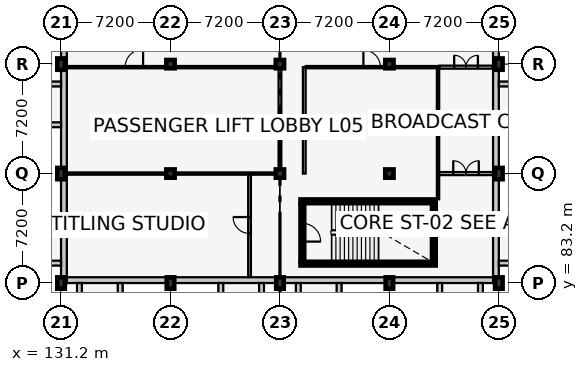
"""IFC4 building model, lengths in metres.
Left out: names, types, materials, properties, quantities, classifications, styles, units other than length and angle.
Written with IfcOpenShell. Run it as: python <this file> out.ifc"""

import sys

from ifc_helpers import new_model, si_unit, direction, frame, frame_2d, origin, origin_2d, place, context, subcontext, project, spatial, rectangle, extrude, element, fill, save


model = new_model("IFC4")
c1 = context("Model", 3, precision=1e-05, world=origin(), true_north=direction((0.0, 1.0)))
c2 = subcontext(c1, "Body", "Model", "MODEL_VIEW")
j1 = project(units=[si_unit("LENGTHUNIT", "METRE"), si_unit("PLANEANGLEUNIT", "RADIAN")], contexts=[c1])
p1 = place(None, origin())
s1 = spatial("IfcSite", under=j1, at=p1, CompositionType="ELEMENT")
p2 = place(p1, origin())
s2 = spatial("IfcBuilding", under=s1, at=p2, CompositionType="ELEMENT")
p3 = place(p2, frame((0.0, 0.0, 21.9)))
s3 = spatial("IfcBuildingStorey", under=s2, at=p3, CompositionType="ELEMENT", Elevation=21.9)
for number, where, z_axis, x_axis in (
    (1, (131.2, 83.2, 0.0), (0.0, 0.0, 1.0), (1.0, 0.0, 0.0)),
    (2, (131.2, 90.4, 0.0), (0.0, 0.0, 1.0), (1.0, 0.0, 0.0)),
    (3, (131.2, 97.6, 0.0), (0.0, 0.0, 1.0), (1.0, 0.0, 0.0)),
    (4, (138.4, 83.2, 0.0), (0.0, 0.0, 1.0), (1.0, 0.0, 0.0)),
):
    element("IfcColumn", number, at=place(p3, frame(where, z_axis=z_axis, x_axis=x_axis)), inside=s3, PredefinedType="COLUMN", context=c2, shape_type="SweptSolid", body=[
        extrude(rectangle(XDim=0.5, YDim=0.75, at=origin_2d()), origin(), (0.0, 0.0, 1.0), 3.9),
    ])
for number, where, z_axis, x_axis in (
    (5, (138.4, 90.4, 0.0), (0.0, 0.0, 1.0), (1.0, 0.0, 0.0)),
    (6, (138.4, 97.6, 0.0), (0.0, 0.0, 1.0), (1.0, 0.0, 0.0)),
):
    element("IfcColumn", number, at=place(p3, frame(where, z_axis=z_axis, x_axis=x_axis)), inside=s3, PredefinedType="COLUMN", context=c2, shape_type="SweptSolid", body=[
        extrude(rectangle(XDim=0.55, YDim=0.55, at=origin_2d()), origin(), (0.0, 0.0, 1.0), 3.9),
    ])
p4 = place(p3, frame((145.6, 83.2, 0.0), z_axis=(0.0, 0.0, 1.0), x_axis=(1.0, 0.0, 0.0)))
e7 = element("IfcColumn", 7, at=p4, inside=s3, PredefinedType="COLUMN", context=c2, shape_type="SweptSolid", body=[
    extrude(rectangle(XDim=0.5, YDim=0.75, at=origin_2d()), origin(), (0.0, 0.0, 1.0), 3.9),
])
for number, where, z_axis, x_axis in (
    (8, (145.6, 90.4, 0.0), (0.0, 0.0, 1.0), (1.0, 0.0, 0.0)),
    (9, (145.6, 97.6, 0.0), (0.0, 0.0, 1.0), (1.0, 0.0, 0.0)),
):
    element("IfcColumn", number, at=place(p3, frame(where, z_axis=z_axis, x_axis=x_axis)), inside=s3, PredefinedType="COLUMN", context=c2, shape_type="SweptSolid", body=[
        extrude(rectangle(XDim=0.55, YDim=0.55, at=origin_2d()), origin(), (0.0, 0.0, 1.0), 3.9),
    ])
p5 = place(p3, frame((152.8, 83.2, 0.0), z_axis=(0.0, 0.0, 1.0), x_axis=(1.0, 0.0, 0.0)))
e10 = element("IfcColumn", 10, at=p5, inside=s3, PredefinedType="COLUMN", context=c2, shape_type="SweptSolid", body=[
    extrude(rectangle(XDim=0.5, YDim=0.75, at=origin_2d()), origin(), (0.0, 0.0, 1.0), 3.9),
])
for number, where, z_axis, x_axis in (
    (11, (152.8, 90.4, 0.0), (0.0, 0.0, 1.0), (1.0, 0.0, 0.0)),
    (12, (152.8, 97.6, 0.0), (0.0, 0.0, 1.0), (1.0, 0.0, 0.0)),
):
    element("IfcColumn", number, at=place(p3, frame(where, z_axis=z_axis, x_axis=x_axis)), inside=s3, PredefinedType="COLUMN", context=c2, shape_type="SweptSolid", body=[
        extrude(rectangle(XDim=0.55, YDim=0.55, at=origin_2d()), origin(), (0.0, 0.0, 1.0), 3.9),
    ])
for number, where, z_axis, x_axis in (
    (13, (160.0, 83.2, 0.0), (0.0, 0.0, 1.0), (1.0, 0.0, 0.0)),
    (14, (160.0, 90.4, 0.0), (0.0, 0.0, 1.0), (1.0, 0.0, 0.0)),
    (15, (160.0, 97.6, 0.0), (0.0, 0.0, 1.0), (1.0, 0.0, 0.0)),
):
    element("IfcColumn", number, at=place(p3, frame(where, z_axis=z_axis, x_axis=x_axis)), inside=s3, PredefinedType="COLUMN", context=c2, shape_type="SweptSolid", body=[
        extrude(rectangle(XDim=0.5, YDim=0.75, at=origin_2d()), origin(), (0.0, 0.0, 1.0), 3.9),
    ])
p6 = place(p3, frame((160.0, 83.39, 0.0), z_axis=(0.0, 0.0, 1.0), x_axis=(-1.0, 0.0, 0.0)))
e16 = element("IfcWall", 16, at=p6, inside=s3, PredefinedType="SOLIDWALL", context=c2, shape_type="SweptSolid", body=[
    extrude(rectangle(XDim=28.8, YDim=0.38, at=frame_2d((14.4, 0.0))), origin(), (0.0, 0.0, 1.0), 2.955),
])
p7 = place(p3, frame((132.41, 83.2, 0.0), z_axis=(0.0, 0.0, 1.0), x_axis=(0.0, -1.0, 0.0)))
e17 = element("IfcWall", 17, at=p7, inside=s3, PredefinedType="SOLIDWALL", context=c2, shape_type="SweptSolid", body=[
    extrude(rectangle(XDim=1.793, YDim=0.32, at=frame_2d((0.896, 0.0))), origin(), (0.0, 0.0, 1.0), 3.64),
])
for number, where, z_axis, x_axis in (
    (18, (135.09, 83.2, 0.0), (0.0, 0.0, 1.0), (0.0, -1.0, 0.0)),
    (19, (141.71, 83.2, 0.0), (0.0, 0.0, 1.0), (0.0, -1.0, 0.0)),
):
    element("IfcWall", number, at=place(p3, frame(where, z_axis=z_axis, x_axis=x_axis)), inside=s3, PredefinedType="SOLIDWALL", context=c2, shape_type="SweptSolid", body=[
        extrude(rectangle(XDim=1.35, YDim=0.32, at=frame_2d((0.675, 0.0))), origin(), (0.0, 0.0, 1.0), 3.64),
    ])
for number, where, z_axis, x_axis in (
    (20, (144.39, 83.2, 0.0), (0.0, 0.0, 1.0), (0.0, -1.0, 0.0)),
    (21, (146.81, 83.2, 0.0), (0.0, 0.0, 1.0), (0.0, -1.0, 0.0)),
):
    element("IfcWall", number, at=place(p3, frame(where, z_axis=z_axis, x_axis=x_axis)), inside=s3, PredefinedType="SOLIDWALL", context=c2, shape_type="SweptSolid", body=[
        extrude(rectangle(XDim=1.793, YDim=0.32, at=frame_2d((0.896, 0.0))), origin(), (0.0, 0.0, 1.0), 3.64),
    ])
for number, where, z_axis, x_axis in (
    (22, (149.49, 83.2, 0.0), (0.0, 0.0, 1.0), (0.0, -1.0, 0.0)),
    (23, (156.11, 83.2, 0.0), (0.0, 0.0, 1.0), (0.0, -1.0, 0.0)),
):
    element("IfcWall", number, at=place(p3, frame(where, z_axis=z_axis, x_axis=x_axis)), inside=s3, PredefinedType="SOLIDWALL", context=c2, shape_type="SweptSolid", body=[
        extrude(rectangle(XDim=1.35, YDim=0.32, at=frame_2d((0.675, 0.0))), origin(), (0.0, 0.0, 1.0), 3.64),
    ])
p8 = place(p3, frame((158.79, 83.2, 0.0), z_axis=(0.0, 0.0, 1.0), x_axis=(0.0, -1.0, 0.0)))
e24 = element("IfcWall", 24, at=p8, inside=s3, PredefinedType="SOLIDWALL", context=c2, shape_type="SweptSolid", body=[
    extrude(rectangle(XDim=1.793, YDim=0.32, at=frame_2d((0.896, 0.0))), origin(), (0.0, 0.0, 1.0), 3.64),
])
p9 = place(p3, frame((159.81, 112.0, 0.0), z_axis=(0.0, 0.0, 1.0), x_axis=(0.0, -1.0, 0.0)))
e25 = element("IfcWall", 25, at=p9, inside=s3, PredefinedType="SOLIDWALL", context=c2, shape_type="SweptSolid", body=[
    extrude(rectangle(XDim=28.8, YDim=0.38, at=frame_2d((14.4, 0.0))), origin(), (0.0, 0.0, 1.0), 2.915),
])
p10 = place(p3, frame((160.0, 84.51, 0.0), z_axis=(0.0, 0.0, 1.0), x_axis=(1.0, 0.0, 0.0)))
e26 = element("IfcWall", 26, at=p10, inside=s3, PredefinedType="SOLIDWALL", context=c2, shape_type="SweptSolid", body=[
    extrude(rectangle(XDim=1.35, YDim=0.32, at=frame_2d((0.675, 0.0))), origin(), (0.0, 0.0, 1.0), 3.64),
])
for number, where, z_axis, x_axis in (
    (27, (160.0, 87.19, 0.0), (0.0, 0.0, 1.0), (1.0, 0.0, 0.0)),
    (28, (160.0, 93.61, 0.0), (0.0, 0.0, 1.0), (1.0, 0.0, 0.0)),
):
    element("IfcWall", number, at=place(p3, frame(where, z_axis=z_axis, x_axis=x_axis)), inside=s3, PredefinedType="SOLIDWALL", context=c2, shape_type="SweptSolid", body=[
        extrude(rectangle(XDim=1.793, YDim=0.32, at=frame_2d((0.896, 0.0))), origin(), (0.0, 0.0, 1.0), 3.64),
    ])
p11 = place(p3, frame((160.0, 96.29, 0.0), z_axis=(0.0, 0.0, 1.0), x_axis=(1.0, 0.0, 0.0)))
e29 = element("IfcWall", 29, at=p11, inside=s3, PredefinedType="SOLIDWALL", context=c2, shape_type="SweptSolid", body=[
    extrude(rectangle(XDim=1.35, YDim=0.32, at=frame_2d((0.675, 0.0))), origin(), (0.0, 0.0, 1.0), 3.64),
])
p12 = place(p3, frame((131.39, 83.2, 0.0), z_axis=(0.0, 0.0, 1.0), x_axis=(0.0, 1.0, 0.0)))
e30 = element("IfcWall", 30, at=p12, inside=s3, PredefinedType="SOLIDWALL", context=c2, shape_type="SweptSolid", body=[
    extrude(rectangle(XDim=28.8, YDim=0.38, at=frame_2d((14.4, 0.0))), origin(), (0.0, 0.0, 1.0), 2.915),
])
p13 = place(p3, frame((131.2, 84.51, 0.0), z_axis=(0.0, 0.0, 1.0), x_axis=(-1.0, 0.0, 0.0)))
e31 = element("IfcWall", 31, at=p13, inside=s3, PredefinedType="SOLIDWALL", context=c2, shape_type="SweptSolid", body=[
    extrude(rectangle(XDim=1.793, YDim=0.32, at=frame_2d((0.896, 0.0))), origin(), (0.0, 0.0, 1.0), 3.64),
])
for number, where, z_axis, x_axis in (
    (32, (131.2, 87.19, 0.0), (0.0, 0.0, 1.0), (-1.0, 0.0, 0.0)),
    (33, (131.2, 93.61, 0.0), (0.0, 0.0, 1.0), (-1.0, 0.0, 0.0)),
):
    element("IfcWall", number, at=place(p3, frame(where, z_axis=z_axis, x_axis=x_axis)), inside=s3, PredefinedType="SOLIDWALL", context=c2, shape_type="SweptSolid", body=[
        extrude(rectangle(XDim=1.35, YDim=0.32, at=frame_2d((0.675, 0.0))), origin(), (0.0, 0.0, 1.0), 3.64),
    ])
p14 = place(p3, frame((131.2, 96.29, 0.0), z_axis=(0.0, 0.0, 1.0), x_axis=(-1.0, 0.0, 0.0)))
e34 = element("IfcWall", 34, at=p14, inside=s3, PredefinedType="SOLIDWALL", context=c2, shape_type="SweptSolid", body=[
    extrude(rectangle(XDim=1.793, YDim=0.32, at=frame_2d((0.896, 0.0))), origin(), (0.0, 0.0, 1.0), 3.64),
])
for number, where, z_axis, x_axis in (
    (35, (146.95, 84.475, 0.0), (0.0, 0.0, 1.0), (1.0, 0.0, 0.0)),
    (36, (155.85, 88.575, 0.0), (0.0, 0.0, 1.0), (-1.0, 0.0, 0.0)),
):
    element("IfcWall", number, at=place(p3, frame(where, z_axis=z_axis, x_axis=x_axis)), inside=s3, PredefinedType="SHEAR", context=c2, shape_type="SweptSolid", body=[
        extrude(rectangle(XDim=8.9, YDim=0.25, at=frame_2d((4.45, 0.0))), origin(), (0.0, 0.0, 1.0), 3.66),
    ])
p15 = place(p3, frame((147.075, 88.45, 0.0), z_axis=(0.0, 0.0, 1.0), x_axis=(0.0, -1.0, 0.0)))
e37 = element("IfcWall", 37, at=p15, inside=s3, PredefinedType="SHEAR", context=c2, shape_type="SweptSolid", body=[
    extrude(rectangle(XDim=3.85, YDim=0.25, at=frame_2d((1.925, 0.0))), origin(), (0.0, 0.0, 1.0), 3.66),
])
p16 = place(p15, frame((1.325, 0.0, 0.0)))
e38 = element("IfcOpeningElement", 38, at=p16, cuts=e37, PredefinedType="OPENING", context=c2, shape_type="SweptSolid", body=[
    extrude(rectangle(XDim=1.2, YDim=2.15, at=frame_2d((0.6, 1.075))), frame((0.0, 0.137, 0.0), z_axis=(0.0, -1.0, 0.0), x_axis=(1.0, 0.0, 0.0)), (0.0, 0.0, 1.0), 0.274),
])
p17 = place(p3, frame((155.725, 84.6, 0.0), z_axis=(0.0, 0.0, 1.0), x_axis=(0.0, 1.0, 0.0)))
e39 = element("IfcWall", 39, at=p17, inside=s3, PredefinedType="SHEAR", context=c2, shape_type="SweptSolid", body=[
    extrude(rectangle(XDim=3.85, YDim=0.25, at=frame_2d((1.925, 0.0))), origin(), (0.0, 0.0, 1.0), 3.66),
])
p18 = place(p3, frame((143.6, 83.6, 0.0), z_axis=(0.0, 0.0, 1.0), x_axis=(0.0, 1.0, 0.0)))
e40 = element("IfcWall", 40, at=p18, inside=s3, PredefinedType="PARTITIONING", context=c2, shape_type="SweptSolid", body=[
    extrude(rectangle(XDim=6.8, YDim=0.18, at=frame_2d((3.4, 0.0))), origin(), (0.0, 0.0, 1.0), 3.66),
])
p19 = place(p18, frame((2.86, 0.0, 0.0)))
e41 = element("IfcOpeningElement", 41, at=p19, cuts=e40, PredefinedType="OPENING", context=c2, shape_type="SweptSolid", body=[
    extrude(rectangle(XDim=1.08, YDim=2.15, at=frame_2d((0.54, 1.075))), frame((0.0, 0.102, 0.0), z_axis=(0.0, -1.0, 0.0), x_axis=(1.0, 0.0, 0.0)), (0.0, 0.0, 1.0), 0.204),
])
p20 = place(p3, frame((145.6, 90.4, 0.0), z_axis=(0.0, 0.0, 1.0), x_axis=(0.0, 1.0, 0.0)))
e42 = element("IfcWall", 42, at=p20, inside=s3, PredefinedType="PARTITIONING", context=c2, shape_type="SweptSolid", body=[
    extrude(rectangle(XDim=7.0, YDim=0.18, at=frame_2d((3.5, 0.0))), origin(), (0.0, 0.0, 1.0), 3.035),
])
p21 = place(p3, frame((147.2, 90.4, 0.0), z_axis=(0.0, 0.0, 1.0), x_axis=(0.0, 1.0, 0.0)))
e43 = element("IfcWall", 43, at=p21, inside=s3, PredefinedType="PARTITIONING", context=c2, shape_type="SweptSolid", body=[
    extrude(rectangle(XDim=7.0, YDim=0.18, at=frame_2d((3.5, 0.0))), origin(), (0.0, 0.0, 1.0), 3.66),
])
p22 = place(p3, frame((131.6, 90.4, 0.0), z_axis=(0.0, 0.0, 1.0), x_axis=(1.0, 0.0, 0.0)))
e44 = element("IfcWall", 44, at=p22, inside=s3, PredefinedType="PARTITIONING", context=c2, shape_type="SweptSolid", body=[
    extrude(rectangle(XDim=13.9, YDim=0.15, at=frame_2d((6.95, 0.0))), origin(), (0.0, 0.0, 1.0), 2.785),
])
p23 = place(p3, frame((131.6, 97.4, 0.0), z_axis=(0.0, 0.0, 1.0), x_axis=(1.0, 0.0, 0.0)))
e45 = element("IfcWall", 45, at=p23, inside=s3, PredefinedType="PARTITIONING", context=c2, shape_type="SweptSolid", body=[
    extrude(rectangle(XDim=13.9, YDim=0.15, at=frame_2d((6.95, 0.0))), origin(), (0.0, 0.0, 1.0), 2.785),
])
p24 = place(p23, frame((3.816, 0.0, 0.0)))
e46 = element("IfcOpeningElement", 46, at=p24, cuts=e45, PredefinedType="OPENING", context=c2, shape_type="SweptSolid", body=[
    extrude(rectangle(XDim=1.18, YDim=2.2, at=frame_2d((0.59, 1.1))), frame((0.0, 0.087, 0.0), z_axis=(0.0, -1.0, 0.0), x_axis=(1.0, 0.0, 0.0)), (0.0, 0.0, 1.0), 0.174),
])
p25 = place(p3, frame((147.3, 97.4, 0.0), z_axis=(0.0, 0.0, 1.0), x_axis=(1.0, 0.0, 0.0)))
e47 = element("IfcWall", 47, at=p25, inside=s3, PredefinedType="PARTITIONING", context=c2, shape_type="SweptSolid", body=[
    extrude(rectangle(XDim=8.7, YDim=0.15, at=frame_2d((4.35, 0.0))), origin(), (0.0, 0.0, 1.0), 2.935),
])
p26 = place(p25, frame((3.79, 0.0, 0.0)))
e48 = element("IfcOpeningElement", 48, at=p26, cuts=e47, PredefinedType="OPENING", context=c2, shape_type="SweptSolid", body=[
    extrude(rectangle(XDim=1.12, YDim=2.15, at=frame_2d((0.56, 1.075))), frame((0.0, 0.087, 0.0), z_axis=(0.0, -1.0, 0.0), x_axis=(1.0, 0.0, 0.0)), (0.0, 0.0, 1.0), 0.174),
])
p27 = place(p3, frame((156.0, 88.71, 0.0), z_axis=(0.0, 0.0, 1.0), x_axis=(0.0, 1.0, 0.0)))
e49 = element("IfcWall", 49, at=p27, inside=s3, PredefinedType="PARTITIONING", context=c2, shape_type="SweptSolid", body=[
    extrude(rectangle(XDim=8.605, YDim=0.15, at=frame_2d((4.302, 0.0))), origin(), (0.0, 0.0, 1.0), 3.66),
])
p28 = place(p3, frame((156.085, 90.4, 0.0), z_axis=(0.0, 0.0, 1.0), x_axis=(1.0, 0.0, 0.0)))
e50 = element("IfcWall", 50, at=p28, inside=s3, PredefinedType="PARTITIONING", context=c2, shape_type="SweptSolid", body=[
    extrude(rectangle(XDim=3.515, YDim=0.2, at=frame_2d((1.758, 0.0))), origin(), (0.0, 0.0, 1.0), 2.935),
])
p29 = place(p28, frame((0.917, 0.0, 0.0)))
e51 = element("IfcOpeningElement", 51, at=p29, cuts=e50, PredefinedType="OPENING", context=c2, shape_type="SweptSolid", body=[
    extrude(rectangle(XDim=1.68, YDim=2.3, at=frame_2d((0.84, 1.15))), frame((0.0, 0.112, 0.0), z_axis=(0.0, -1.0, 0.0), x_axis=(1.0, 0.0, 0.0)), (0.0, 0.0, 1.0), 0.224),
])
p30 = place(p3, frame((156.085, 97.4, 0.0), z_axis=(0.0, 0.0, 1.0), x_axis=(1.0, 0.0, 0.0)))
e52 = element("IfcWall", 52, at=p30, inside=s3, PredefinedType="PARTITIONING", context=c2, shape_type="SweptSolid", body=[
    extrude(rectangle(XDim=3.515, YDim=0.2, at=frame_2d((1.758, 0.0))), origin(), (0.0, 0.0, 1.0), 2.935),
])
p31 = place(p30, frame((0.978, 0.0, 0.0)))
e53 = element("IfcOpeningElement", 53, at=p31, cuts=e52, PredefinedType="OPENING", context=c2, shape_type="SweptSolid", body=[
    extrude(rectangle(XDim=1.56, YDim=2.25, at=frame_2d((0.78, 1.125))), frame((0.0, 0.112, 0.0), z_axis=(0.0, -1.0, 0.0), x_axis=(1.0, 0.0, 0.0)), (0.0, 0.0, 1.0), 0.224),
])
p32 = place(p16, origin())
e54 = element("IfcDoor", 54, at=p32, inside=s3, OperationType="SINGLE_SWING_RIGHT", PredefinedType="DOOR", context=c2, shape_type="SweptSolid", body=[
    extrude(rectangle(XDim=1.2, YDim=2.15, at=frame_2d((0.6, 1.075))), frame((0.0, 0.025, 0.0), z_axis=(0.0, -1.0, 0.0), x_axis=(1.0, 0.0, 0.0)), (0.0, 0.0, 1.0), 0.05),
])
fill(e38, e54)
p33 = place(p24, origin())
e55 = element("IfcDoor", 55, at=p33, inside=s3, OperationType="SINGLE_SWING_RIGHT", PredefinedType="DOOR", context=c2, shape_type="SweptSolid", body=[
    extrude(rectangle(XDim=1.18, YDim=2.2, at=frame_2d((0.59, 1.1))), frame((0.0, 0.025, 0.0), z_axis=(0.0, -1.0, 0.0), x_axis=(1.0, 0.0, 0.0)), (0.0, 0.0, 1.0), 0.05),
])
fill(e46, e55)
p34 = place(p26, origin())
e56 = element("IfcDoor", 56, at=p34, inside=s3, OperationType="SINGLE_SWING_LEFT", PredefinedType="DOOR", context=c2, shape_type="SweptSolid", body=[
    extrude(rectangle(XDim=1.12, YDim=2.15, at=frame_2d((0.56, 1.075))), frame((0.0, 0.025, 0.0), z_axis=(0.0, -1.0, 0.0), x_axis=(1.0, 0.0, 0.0)), (0.0, 0.0, 1.0), 0.05),
])
fill(e48, e56)
p35 = place(p19, origin())
e57 = element("IfcDoor", 57, at=p35, inside=s3, OperationType="SINGLE_SWING_RIGHT", PredefinedType="DOOR", context=c2, shape_type="SweptSolid", body=[
    extrude(rectangle(XDim=1.08, YDim=2.15, at=frame_2d((0.54, 1.075))), frame((0.0, 0.025, 0.0), z_axis=(0.0, -1.0, 0.0), x_axis=(1.0, 0.0, 0.0)), (0.0, 0.0, 1.0), 0.05),
])
fill(e41, e57)
p36 = place(p29, origin())
e58 = element("IfcDoor", 58, at=p36, inside=s3, OperationType="DOUBLE_DOOR_SINGLE_SWING", PredefinedType="DOOR", context=c2, shape_type="SweptSolid", body=[
    extrude(rectangle(XDim=1.68, YDim=2.3, at=frame_2d((0.84, 1.15))), frame((0.0, 0.025, 0.0), z_axis=(0.0, -1.0, 0.0), x_axis=(1.0, 0.0, 0.0)), (0.0, 0.0, 1.0), 0.05),
])
fill(e51, e58)
p37 = place(p31, origin())
e59 = element("IfcDoor", 59, at=p37, inside=s3, OperationType="DOUBLE_DOOR_SINGLE_SWING", PredefinedType="DOOR", context=c2, shape_type="SweptSolid", body=[
    extrude(rectangle(XDim=1.56, YDim=2.25, at=frame_2d((0.78, 1.125))), frame((0.0, 0.025, 0.0), z_axis=(0.0, -1.0, 0.0), x_axis=(1.0, 0.0, 0.0)), (0.0, 0.0, 1.0), 0.05),
])
fill(e53, e59)
save(model, sys.argv[1])
